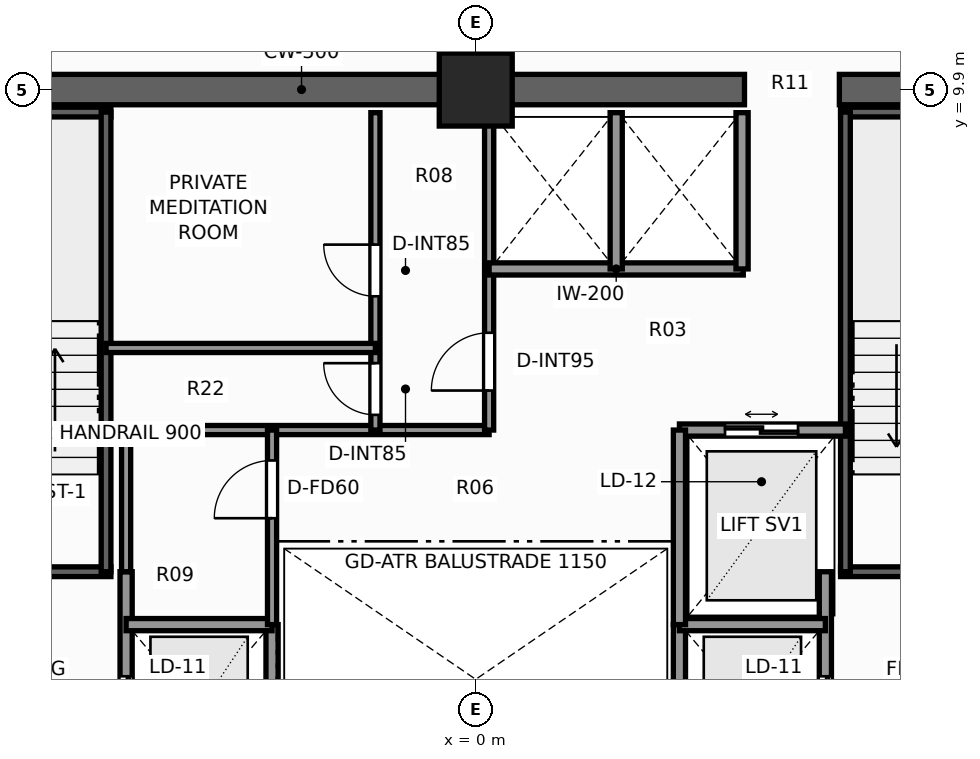
"""IFC4 building model, lengths in metres.
Left out: names, types, materials, properties, quantities, classifications, styles, units other than length and angle.
Written with IfcOpenShell. Run it as: python <this file> out.ifc"""

import sys

from ifc_helpers import new_model, si_unit, direction, frame, frame_2d, origin, origin_2d, place, context, subcontext, project, spatial, rectangle, extrude, element, fill, save


model = new_model("IFC4")
c1 = context("Model", 3, precision=1e-05, world=origin(), true_north=direction((0.0, 1.0)))
c2 = subcontext(c1, "Body", "Model", "MODEL_VIEW")
j1 = project(units=[si_unit("LENGTHUNIT", "METRE"), si_unit("PLANEANGLEUNIT", "RADIAN")], contexts=[c1])
p1 = place(None, origin())
s1 = spatial("IfcSite", under=j1, at=p1, CompositionType="ELEMENT")
p2 = place(p1, origin())
s2 = spatial("IfcBuilding", under=s1, at=p2, CompositionType="ELEMENT")
p3 = place(p2, frame((0.0, 0.0, 111.8)))
s3 = spatial("IfcBuildingStorey", under=s2, at=p3, CompositionType="ELEMENT", Elevation=111.8)
p4 = place(p3, frame((-10.15, 9.9, 0.0), z_axis=(0.0, 0.0, 1.0), x_axis=(1.0, 0.0, 0.0)))
e1 = element("IfcWall", 1, at=p4, inside=s3, PredefinedType="SHEAR", context=c2, shape_type="SweptSolid", body=[
    extrude(rectangle(XDim=14.57, YDim=0.5, at=frame_2d((7.285, 0.0))), origin(), (0.0, 0.0, 1.0), 3.3),
])
p5 = place(p3, frame((5.98, 9.9, 0.0), z_axis=(0.0, 0.0, 1.0), x_axis=(1.0, 0.0, 0.0)))
e2 = element("IfcWall", 2, at=p5, inside=s3, PredefinedType="SHEAR", context=c2, shape_type="SweptSolid", body=[
    extrude(rectangle(XDim=4.17, YDim=0.5, at=frame_2d((2.085, 0.0))), origin(), (0.0, 0.0, 1.0), 3.3),
])
p6 = place(p3, frame((0.0, 9.9, 0.0), z_axis=(0.0, 0.0, 1.0), x_axis=(1.0, 0.0, 0.0)))
e3 = element("IfcColumn", 3, at=p6, inside=s3, PredefinedType="COLUMN", context=c2, shape_type="SweptSolid", body=[
    extrude(rectangle(XDim=1.2, YDim=1.2, at=origin_2d()), origin(), (0.0, 0.0, 1.0), 3.3),
])
p7 = place(p3, frame((-9.52, 1.97, 0.0), z_axis=(0.0, 0.0, 1.0), x_axis=(1.0, 0.0, 0.0)))
e4 = element("IfcWall", 4, at=p7, inside=s3, PredefinedType="SHEAR", context=c2, shape_type="SweptSolid", body=[
    extrude(rectangle(XDim=3.52, YDim=0.16, at=frame_2d((1.76, 0.0))), origin(), (0.0, 0.0, 1.0), 3.3),
])
p8 = place(p7, frame((1.15, 0.0, 0.0)))
e5 = element("IfcOpeningElement", 5, at=p8, cuts=e4, PredefinedType="OPENING", context=c2, shape_type="SweptSolid", body=[
    extrude(rectangle(XDim=1.1, YDim=2.2, at=frame_2d((0.55, 1.1))), frame((0.0, 0.09, 0.0), z_axis=(0.0, -1.0, 0.0), x_axis=(1.0, 0.0, 0.0)), (0.0, 0.0, 1.0), 0.18),
])
p9 = place(p3, frame((-9.52, 9.53, 0.0), z_axis=(0.0, 0.0, 1.0), x_axis=(1.0, 0.0, 0.0)))
e6 = element("IfcWall", 6, at=p9, inside=s3, PredefinedType="SHEAR", context=c2, shape_type="SweptSolid", body=[
    extrude(rectangle(XDim=3.52, YDim=0.16, at=frame_2d((1.76, 0.0))), origin(), (0.0, 0.0, 1.0), 3.3),
])
p10 = place(p3, frame((-6.08, 1.97, 0.0), z_axis=(0.0, 0.0, 1.0), x_axis=(0.0, 1.0, 0.0)))
e7 = element("IfcWall", 7, at=p10, inside=s3, PredefinedType="SHEAR", context=c2, shape_type="SweptSolid", body=[
    extrude(rectangle(XDim=7.56, YDim=0.16, at=frame_2d((3.78, 0.0))), origin(), (0.0, 0.0, 1.0), 3.3),
])
p11 = place(p3, frame((6.0, 1.97, 0.0), z_axis=(0.0, 0.0, 1.0), x_axis=(1.0, 0.0, 0.0)))
e8 = element("IfcWall", 8, at=p11, inside=s3, PredefinedType="SHEAR", context=c2, shape_type="SweptSolid", body=[
    extrude(rectangle(XDim=3.52, YDim=0.16, at=frame_2d((1.76, 0.0))), origin(), (0.0, 0.0, 1.0), 3.3),
])
p12 = place(p11, frame((1.15, 0.0, 0.0)))
e9 = element("IfcOpeningElement", 9, at=p12, cuts=e8, PredefinedType="OPENING", context=c2, shape_type="SweptSolid", body=[
    extrude(rectangle(XDim=1.1, YDim=2.2, at=frame_2d((0.55, 1.1))), frame((0.0, 0.09, 0.0), z_axis=(0.0, -1.0, 0.0), x_axis=(1.0, 0.0, 0.0)), (0.0, 0.0, 1.0), 0.18),
])
p13 = place(p3, frame((6.0, 9.53, 0.0), z_axis=(0.0, 0.0, 1.0), x_axis=(1.0, 0.0, 0.0)))
e10 = element("IfcWall", 10, at=p13, inside=s3, PredefinedType="SHEAR", context=c2, shape_type="SweptSolid", body=[
    extrude(rectangle(XDim=3.52, YDim=0.16, at=frame_2d((1.76, 0.0))), origin(), (0.0, 0.0, 1.0), 3.3),
])
p14 = place(p3, frame((6.08, 1.97, 0.0), z_axis=(0.0, 0.0, 1.0), x_axis=(0.0, 1.0, 0.0)))
e11 = element("IfcWall", 11, at=p14, inside=s3, PredefinedType="SHEAR", context=c2, shape_type="SweptSolid", body=[
    extrude(rectangle(XDim=7.56, YDim=0.16, at=frame_2d((3.78, 0.0))), origin(), (0.0, 0.0, 1.0), 3.3),
])
p15 = place(p3, frame((-5.75, -3.6, 0.0), z_axis=(0.0, 0.0, 1.0), x_axis=(0.0, 1.0, 0.0)))
e12 = element("IfcWall", 12, at=p15, inside=s3, PredefinedType="SOLIDWALL", context=c2, shape_type="SweptSolid", body=[
    extrude(rectangle(XDim=5.57, YDim=0.2, at=frame_2d((2.785, 0.0))), origin(), (0.0, 0.0, 1.0), 2.715),
])
p16 = place(p15, frame((2.75, 0.0, 0.0)))
e13 = element("IfcOpeningElement", 13, at=p16, cuts=e12, PredefinedType="OPENING", context=c2, shape_type="SweptSolid", body=[
    extrude(rectangle(XDim=1.1, YDim=2.2, at=frame_2d((0.55, 1.1))), frame((0.0, 0.11, 0.0), z_axis=(0.0, -1.0, 0.0), x_axis=(1.0, 0.0, 0.0)), (0.0, 0.0, 1.0), 0.22),
])
p17 = place(p3, frame((-3.35, -1.7, 0.0), z_axis=(0.0, 0.0, 1.0), x_axis=(0.0, 1.0, 0.0)))
e14 = element("IfcWall", 14, at=p17, inside=s3, PredefinedType="SOLIDWALL", context=c2, shape_type="SweptSolid", body=[
    extrude(rectangle(XDim=2.8, YDim=0.2, at=frame_2d((1.4, 0.0))), origin(), (0.0, 0.0, 1.0), 2.715),
])
p18 = place(p3, frame((-5.75, 1.1, 0.0), z_axis=(0.0, 0.0, 1.0), x_axis=(1.0, 0.0, 0.0)))
e15 = element("IfcWall", 15, at=p18, inside=s3, PredefinedType="SOLIDWALL", context=c2, shape_type="SweptSolid", body=[
    extrude(rectangle(XDim=2.4, YDim=0.2, at=frame_2d((1.2, 0.0))), origin(), (0.0, 0.0, 1.0), 3.08),
])
p19 = place(p3, frame((5.75, -3.6, 0.0), z_axis=(0.0, 0.0, 1.0), x_axis=(0.0, 1.0, 0.0)))
e16 = element("IfcWall", 16, at=p19, inside=s3, PredefinedType="SOLIDWALL", context=c2, shape_type="SweptSolid", body=[
    extrude(rectangle(XDim=5.57, YDim=0.2, at=frame_2d((2.785, 0.0))), origin(), (0.0, 0.0, 1.0), 2.715),
])
p20 = place(p19, frame((2.75, 0.0, 0.0)))
e17 = element("IfcOpeningElement", 17, at=p20, cuts=e16, PredefinedType="OPENING", context=c2, shape_type="SweptSolid", body=[
    extrude(rectangle(XDim=1.1, YDim=2.2, at=frame_2d((0.55, 1.1))), frame((0.0, 0.11, 0.0), z_axis=(0.0, -1.0, 0.0), x_axis=(1.0, 0.0, 0.0)), (0.0, 0.0, 1.0), 0.22),
])
p21 = place(p3, frame((3.35, -1.7, 0.0), z_axis=(0.0, 0.0, 1.0), x_axis=(0.0, 1.0, 0.0)))
e18 = element("IfcWall", 18, at=p21, inside=s3, PredefinedType="SOLIDWALL", context=c2, shape_type="SweptSolid", body=[
    extrude(rectangle(XDim=2.8, YDim=0.2, at=frame_2d((1.4, 0.0))), origin(), (0.0, 0.0, 1.0), 2.715),
])
p22 = place(p3, frame((3.35, 1.1, 0.0), z_axis=(0.0, 0.0, 1.0), x_axis=(1.0, 0.0, 0.0)))
e19 = element("IfcWall", 19, at=p22, inside=s3, PredefinedType="SOLIDWALL", context=c2, shape_type="SweptSolid", body=[
    extrude(rectangle(XDim=2.4, YDim=0.2, at=frame_2d((1.2, 0.0))), origin(), (0.0, 0.0, 1.0), 3.08),
])
p23 = place(p3, frame((3.35, 4.3, 0.0), z_axis=(0.0, 0.0, 1.0), x_axis=(1.0, 0.0, 0.0)))
e20 = element("IfcWall", 20, at=p23, inside=s3, PredefinedType="SOLIDWALL", context=c2, shape_type="SweptSolid", body=[
    extrude(rectangle(XDim=2.73, YDim=0.2, at=frame_2d((1.365, 0.0))), origin(), (0.0, 0.0, 1.0), 3.08),
])
p24 = place(p23, frame((0.75, 0.0, 0.0)))
e21 = element("IfcOpeningElement", 21, at=p24, cuts=e20, PredefinedType="OPENING", context=c2, shape_type="SweptSolid", body=[
    extrude(rectangle(XDim=1.2, YDim=2.25, at=frame_2d((0.6, 1.125))), frame((0.0, 0.11, 0.0), z_axis=(0.0, -1.0, 0.0), x_axis=(1.0, 0.0, 0.0)), (0.0, 0.0, 1.0), 0.22),
])
p25 = place(p3, frame((3.35, 1.1, 0.0), z_axis=(0.0, 0.0, 1.0), x_axis=(0.0, 1.0, 0.0)))
e22 = element("IfcWall", 22, at=p25, inside=s3, PredefinedType="SOLIDWALL", context=c2, shape_type="SweptSolid", body=[
    extrude(rectangle(XDim=3.2, YDim=0.2, at=frame_2d((1.6, 0.0))), origin(), (0.0, 0.0, 1.0), 2.715),
])
p26 = place(p3, frame((-6.08, 4.3, 0.0), z_axis=(0.0, 0.0, 1.0), x_axis=(1.0, 0.0, 0.0)))
e23 = element("IfcWall", 23, at=p26, inside=s3, PredefinedType="PARTITIONING", context=c2, shape_type="SweptSolid", body=[
    extrude(rectangle(XDim=6.3, YDim=0.15, at=frame_2d((3.15, 0.0))), origin(), (0.0, 0.0, 1.0), 3.08),
])
p27 = place(p3, frame((0.22, 4.3, 0.0), z_axis=(0.0, 0.0, 1.0), x_axis=(0.0, 1.0, 0.0)))
e24 = element("IfcWall", 24, at=p27, inside=s3, PredefinedType="PARTITIONING", context=c2, shape_type="SweptSolid", body=[
    extrude(rectangle(XDim=5.22, YDim=0.15, at=frame_2d((2.61, 0.0))), origin(), (0.0, 0.0, 1.0), 3.08),
])
p28 = place(p27, frame((0.65, 0.0, 0.0)))
e25 = element("IfcOpeningElement", 25, at=p28, cuts=e24, PredefinedType="OPENING", context=c2, shape_type="SweptSolid", body=[
    extrude(rectangle(XDim=0.95, YDim=2.06, at=frame_2d((0.475, 1.03))), frame((0.0, 0.085, 0.0), z_axis=(0.0, -1.0, 0.0), x_axis=(1.0, 0.0, 0.0)), (0.0, 0.0, 1.0), 0.17),
])
p29 = place(p3, frame((-1.65, 4.3, 0.0), z_axis=(0.0, 0.0, 1.0), x_axis=(0.0, 1.0, 0.0)))
e26 = element("IfcWall", 26, at=p29, inside=s3, PredefinedType="PARTITIONING", context=c2, shape_type="SweptSolid", body=[
    extrude(rectangle(XDim=5.22, YDim=0.15, at=frame_2d((2.61, 0.0))), origin(), (0.0, 0.0, 1.0), 3.08),
])
p30 = place(p29, frame((2.2, 0.0, 0.0)))
e27 = element("IfcOpeningElement", 27, at=p30, cuts=e26, PredefinedType="OPENING", context=c2, shape_type="SweptSolid", body=[
    extrude(rectangle(XDim=0.85, YDim=2.03, at=frame_2d((0.425, 1.015))), frame((0.0, 0.085, 0.0), z_axis=(0.0, -1.0, 0.0), x_axis=(1.0, 0.0, 0.0)), (0.0, 0.0, 1.0), 0.17),
])
p31 = place(p29, frame((0.25, 0.0, 0.0)))
e28 = element("IfcOpeningElement", 28, at=p31, cuts=e26, PredefinedType="OPENING", context=c2, shape_type="SweptSolid", body=[
    extrude(rectangle(XDim=0.85, YDim=2.03, at=frame_2d((0.425, 1.015))), frame((0.0, 0.085, 0.0), z_axis=(0.0, -1.0, 0.0), x_axis=(1.0, 0.0, 0.0)), (0.0, 0.0, 1.0), 0.17),
])
p32 = place(p3, frame((-6.08, 5.65, 0.0), z_axis=(0.0, 0.0, 1.0), x_axis=(1.0, 0.0, 0.0)))
e29 = element("IfcWall", 29, at=p32, inside=s3, PredefinedType="PARTITIONING", context=c2, shape_type="SweptSolid", body=[
    extrude(rectangle(XDim=4.43, YDim=0.15, at=frame_2d((2.215, 0.0))), origin(), (0.0, 0.0, 1.0), 3.08),
])
p33 = place(p3, frame((0.22, 6.95, 0.0), z_axis=(0.0, 0.0, 1.0), x_axis=(1.0, 0.0, 0.0)))
e30 = element("IfcWall", 30, at=p33, inside=s3, PredefinedType="SOLIDWALL", context=c2, shape_type="SweptSolid", body=[
    extrude(rectangle(XDim=4.18, YDim=0.2, at=frame_2d((2.09, 0.0))), origin(), (0.0, 0.0, 1.0), 3.08),
])
for number, where, z_axis, x_axis in (
    (31, (4.38, 6.95, 0.0), (0.0, 0.0, 1.0), (0.0, 1.0, 0.0)),
    (32, (2.31, 6.95, 0.0), (0.0, 0.0, 1.0), (0.0, 1.0, 0.0)),
):
    element("IfcWall", number, at=place(p3, frame(where, z_axis=z_axis, x_axis=x_axis)), inside=s3, PredefinedType="SOLIDWALL", context=c2, shape_type="SweptSolid", body=[
        extrude(rectangle(XDim=2.57, YDim=0.2, at=frame_2d((1.285, 0.0))), origin(), (0.0, 0.0, 1.0), 3.08),
    ])
p34 = place(p3, frame((-3.35, 1.1, 0.0), z_axis=(0.0, 0.0, 1.0), x_axis=(0.0, 1.0, 0.0)))
e33 = element("IfcWall", 33, at=p34, inside=s3, PredefinedType="PARTITIONING", context=c2, shape_type="SweptSolid", body=[
    extrude(rectangle(XDim=3.2, YDim=0.15, at=frame_2d((1.6, 0.0))), origin(), (0.0, 0.0, 1.0), 2.715),
])
p35 = place(p34, frame((1.75, 0.0, 0.0)))
e34 = element("IfcOpeningElement", 34, at=p35, cuts=e33, PredefinedType="OPENING", context=c2, shape_type="SweptSolid", body=[
    extrude(rectangle(XDim=0.95, YDim=2.06, at=frame_2d((0.475, 1.03))), frame((0.0, 0.085, 0.0), z_axis=(0.0, -1.0, 0.0), x_axis=(1.0, 0.0, 0.0)), (0.0, 0.0, 1.0), 0.17),
])
p36 = place(p3, frame((-5.75, 1.97, 0.0), z_axis=(0.0, 0.0, 1.0), x_axis=(0.0, 1.0, 0.0)))
e35 = element("IfcWall", 35, at=p36, inside=s3, PredefinedType="PARTITIONING", context=c2, shape_type="SweptSolid", body=[
    extrude(rectangle(XDim=2.33, YDim=0.15, at=frame_2d((1.165, 0.0))), origin(), (0.0, 0.0, 1.0), 2.715),
])
p37 = place(p16, origin())
e36 = element("IfcDoor", 36, at=p37, inside=s3, OperationType="DOUBLE_DOOR_SLIDING", PredefinedType="DOOR", context=c2, shape_type="SweptSolid", body=[
    extrude(rectangle(XDim=1.1, YDim=2.2, at=frame_2d((0.55, 1.1))), frame((0.0, 0.025, 0.0), z_axis=(0.0, -1.0, 0.0), x_axis=(1.0, 0.0, 0.0)), (0.0, 0.0, 1.0), 0.05),
])
fill(e13, e36)
p38 = place(p20, origin())
e37 = element("IfcDoor", 37, at=p38, inside=s3, OperationType="DOUBLE_DOOR_SLIDING", PredefinedType="DOOR", context=c2, shape_type="SweptSolid", body=[
    extrude(rectangle(XDim=1.1, YDim=2.2, at=frame_2d((0.55, 1.1))), frame((0.0, 0.025, 0.0), z_axis=(0.0, -1.0, 0.0), x_axis=(1.0, 0.0, 0.0)), (0.0, 0.0, 1.0), 0.05),
])
fill(e17, e37)
p39 = place(p24, origin())
e38 = element("IfcDoor", 38, at=p39, inside=s3, OperationType="DOUBLE_DOOR_SLIDING", PredefinedType="DOOR", context=c2, shape_type="SweptSolid", body=[
    extrude(rectangle(XDim=1.2, YDim=2.25, at=frame_2d((0.6, 1.125))), frame((0.0, 0.025, 0.0), z_axis=(0.0, -1.0, 0.0), x_axis=(1.0, 0.0, 0.0)), (0.0, 0.0, 1.0), 0.05),
])
fill(e21, e38)
p40 = place(p28, origin())
e39 = element("IfcDoor", 39, at=p40, inside=s3, OperationType="SINGLE_SWING_LEFT", PredefinedType="DOOR", context=c2, shape_type="SweptSolid", body=[
    extrude(rectangle(XDim=0.95, YDim=2.06, at=frame_2d((0.475, 1.03))), frame((0.0, 0.025, 0.0), z_axis=(0.0, -1.0, 0.0), x_axis=(1.0, 0.0, 0.0)), (0.0, 0.0, 1.0), 0.05),
])
fill(e25, e39)
p41 = place(p30, origin())
e40 = element("IfcDoor", 40, at=p41, inside=s3, OperationType="SINGLE_SWING_RIGHT", PredefinedType="DOOR", context=c2, shape_type="SweptSolid", body=[
    extrude(rectangle(XDim=0.85, YDim=2.03, at=frame_2d((0.425, 1.015))), frame((0.0, 0.025, 0.0), z_axis=(0.0, -1.0, 0.0), x_axis=(1.0, 0.0, 0.0)), (0.0, 0.0, 1.0), 0.05),
])
fill(e27, e40)
p42 = place(p31, origin())
e41 = element("IfcDoor", 41, at=p42, inside=s3, OperationType="SINGLE_SWING_RIGHT", PredefinedType="DOOR", context=c2, shape_type="SweptSolid", body=[
    extrude(rectangle(XDim=0.85, YDim=2.03, at=frame_2d((0.425, 1.015))), frame((0.0, 0.025, 0.0), z_axis=(0.0, -1.0, 0.0), x_axis=(1.0, 0.0, 0.0)), (0.0, 0.0, 1.0), 0.05),
])
fill(e28, e41)
p43 = place(p35, origin())
e42 = element("IfcDoor", 42, at=p43, inside=s3, OperationType="SINGLE_SWING_LEFT", PredefinedType="DOOR", context=c2, shape_type="SweptSolid", body=[
    extrude(rectangle(XDim=0.95, YDim=2.06, at=frame_2d((0.475, 1.03))), frame((0.0, 0.025, 0.0), z_axis=(0.0, -1.0, 0.0), x_axis=(1.0, 0.0, 0.0)), (0.0, 0.0, 1.0), 0.05),
])
fill(e34, e42)
save(model, sys.argv[1])
